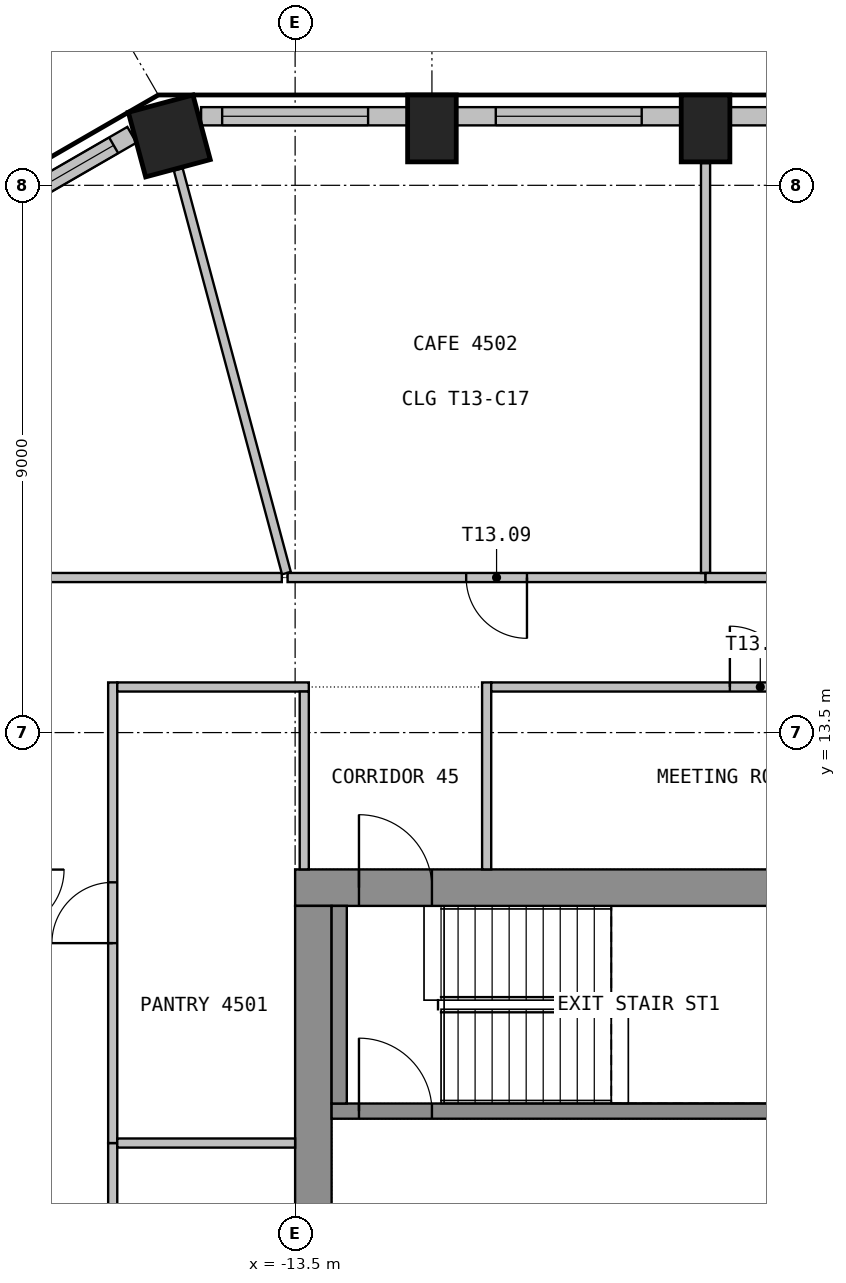
"""IFC4 building model, lengths in metres.
Left out: names, types, materials, properties, quantities, classifications, styles, units other than length and angle.
Written with IfcOpenShell. Run it as: python <this file> out.ifc"""

import sys

from ifc_helpers import new_model, si_unit, direction, frame, frame_2d, origin, origin_2d, place, context, subcontext, project, spatial, rectangle, extrude, element, fill, save


model = new_model("IFC4")
c1 = context("Model", 3, precision=1e-05, world=origin(), true_north=direction((0.0, 1.0)))
c2 = subcontext(c1, "Body", "Model", "MODEL_VIEW")
j1 = project(units=[si_unit("LENGTHUNIT", "METRE"), si_unit("PLANEANGLEUNIT", "RADIAN")], contexts=[c1])
p1 = place(None, origin())
s1 = spatial("IfcSite", under=j1, at=p1, CompositionType="ELEMENT")
p2 = place(p1, origin())
s2 = spatial("IfcBuilding", under=s1, at=p2, CompositionType="ELEMENT")
p3 = place(p2, frame((0.0, 0.0, 183.9)))
s3 = spatial("IfcBuildingStorey", under=s2, at=p3, CompositionType="ELEMENT", Elevation=183.9)
for number, where, z_axis, x_axis in (
    (1, (-6.75, 23.436, 0.0), (0.0, 0.0, 1.0), (-1.0, 0.0, 0.0)),
    (2, (-11.25, 23.436, 0.0), (0.0, 0.0, 1.0), (-1.0, 0.0, 0.0)),
):
    element("IfcColumn", number, at=place(p3, frame(where, z_axis=z_axis, x_axis=x_axis)), inside=s3, PredefinedType="COLUMN", context=c2, shape_type="SweptSolid", body=[
        extrude(rectangle(XDim=0.8, YDim=1.1, at=origin_2d()), origin(), (0.0, 0.0, 1.0), 3.55),
    ])
p4 = place(p3, frame((-15.57, 23.312, 0.0), z_axis=(0.0, 0.0, 1.0), x_axis=(-0.965925826289, -0.258819045103, 0.0)))
e3 = element("IfcColumn", 3, at=p4, inside=s3, PredefinedType="COLUMN", context=c2, shape_type="SweptSolid", body=[
    extrude(rectangle(XDim=1.1, YDim=1.1, at=origin_2d()), origin(), (0.0, 0.0, 1.0), 3.55),
])
p5 = place(p3, frame((-2.65, 23.635, 0.0), z_axis=(0.0, 0.0, 1.0), x_axis=(-1.0, 0.0, 0.0)))
e4 = element("IfcWall", 4, at=p5, inside=s3, PredefinedType="SOLIDWALL", context=c2, shape_type="SweptSolid", body=[
    extrude(rectangle(XDim=3.699, YDim=0.3, at=frame_2d((1.85, 0.0))), origin(), (0.0, 0.0, 1.0), 3.55),
])
p6 = place(p5, frame((0.649, 0.0, 0.9)))
e5 = element("IfcOpeningElement", 5, at=p6, cuts=e4, PredefinedType="OPENING", context=c2, shape_type="SweptSolid", body=[
    extrude(rectangle(XDim=2.4, YDim=2.1, at=frame_2d((1.2, 1.05))), frame((0.0, 0.16, 0.0), z_axis=(0.0, -1.0, 0.0), x_axis=(1.0, 0.0, 0.0)), (0.0, 0.0, 1.0), 0.32),
])
p7 = place(p3, frame((-7.15, 23.635, 0.0), z_axis=(0.0, 0.0, 1.0), x_axis=(-1.0, 0.0, 0.0)))
e6 = element("IfcWall", 6, at=p7, inside=s3, PredefinedType="SOLIDWALL", context=c2, shape_type="SweptSolid", body=[
    extrude(rectangle(XDim=3.699, YDim=0.3, at=frame_2d((1.85, 0.0))), origin(), (0.0, 0.0, 1.0), 3.55),
])
p8 = place(p7, frame((0.649, 0.0, 0.9)))
e7 = element("IfcOpeningElement", 7, at=p8, cuts=e6, PredefinedType="OPENING", context=c2, shape_type="SweptSolid", body=[
    extrude(rectangle(XDim=2.4, YDim=2.1, at=frame_2d((1.2, 1.05))), frame((0.0, 0.16, 0.0), z_axis=(0.0, -1.0, 0.0), x_axis=(1.0, 0.0, 0.0)), (0.0, 0.0, 1.0), 0.32),
])
p9 = place(p3, frame((-11.65, 23.635, 0.0), z_axis=(0.0, 0.0, 1.0), x_axis=(-1.0, 0.0, 0.0)))
e8 = element("IfcWall", 8, at=p9, inside=s3, PredefinedType="SOLIDWALL", context=c2, shape_type="SweptSolid", body=[
    extrude(rectangle(XDim=3.396, YDim=0.3, at=frame_2d((1.698, 0.0))), origin(), (0.0, 0.0, 1.0), 3.55),
])
p10 = place(p9, frame((0.649, 0.0, 0.9)))
e9 = element("IfcOpeningElement", 9, at=p10, cuts=e8, PredefinedType="OPENING", context=c2, shape_type="SweptSolid", body=[
    extrude(rectangle(XDim=2.4, YDim=2.1, at=frame_2d((1.2, 1.05))), frame((0.0, 0.16, 0.0), z_axis=(0.0, -1.0, 0.0), x_axis=(1.0, 0.0, 0.0)), (0.0, 0.0, 1.0), 0.32),
])
p11 = place(p3, frame((-16.184, 23.331, 0.0), z_axis=(0.0, 0.0, 1.0), x_axis=(-0.865994975416, -0.500052699777, 0.0)))
e10 = element("IfcWall", 10, at=p11, inside=s3, PredefinedType="SOLIDWALL", context=c2, shape_type="SweptSolid", body=[
    extrude(rectangle(XDim=3.093, YDim=0.3, at=frame_2d((1.546, 0.0))), origin(), (0.0, 0.0, 1.0), 3.55),
])
p12 = place(p11, frame((0.346, 0.0, 0.9)))
e11 = element("IfcOpeningElement", 11, at=p12, cuts=e10, PredefinedType="OPENING", context=c2, shape_type="SweptSolid", body=[
    extrude(rectangle(XDim=2.4, YDim=2.1, at=frame_2d((1.2, 1.05))), frame((0.0, 0.16, 0.0), z_axis=(0.0, -1.0, 0.0), x_axis=(1.0, 0.0, 0.0)), (0.0, 0.0, 1.0), 0.32),
])
p13 = place(p3, frame((-13.5, 10.95, 0.0), z_axis=(0.0, 0.0, 1.0), x_axis=(1.0, 0.0, 0.0)))
e12 = element("IfcWall", 12, at=p13, inside=s3, PredefinedType="SHEAR", context=c2, shape_type="SweptSolid", body=[
    extrude(rectangle(XDim=27.0, YDim=0.6, at=frame_2d((13.5, 0.0))), origin(), (0.0, 0.0, 1.0), 3.55),
])
p14 = place(p13, frame((12.3, 0.0, 0.0)))
e13 = element("IfcOpeningElement", 13, at=p14, cuts=e12, PredefinedType="OPENING", context=c2, shape_type="SweptSolid", body=[
    extrude(rectangle(XDim=2.4, YDim=2.1, at=frame_2d((1.2, 1.05))), frame((0.0, 0.31, 0.0), z_axis=(0.0, -1.0, 0.0), x_axis=(1.0, 0.0, 0.0)), (0.0, 0.0, 1.0), 0.62),
])
p15 = place(p13, frame((1.05, 0.0, 0.0)))
e14 = element("IfcOpeningElement", 14, at=p15, cuts=e12, PredefinedType="OPENING", context=c2, shape_type="SweptSolid", body=[
    extrude(rectangle(XDim=1.2, YDim=2.1, at=frame_2d((0.6, 1.05))), frame((0.0, 0.31, 0.0), z_axis=(0.0, -1.0, 0.0), x_axis=(1.0, 0.0, 0.0)), (0.0, 0.0, 1.0), 0.62),
])
p16 = place(p13, frame((24.75, 0.0, 0.0)))
e15 = element("IfcOpeningElement", 15, at=p16, cuts=e12, PredefinedType="OPENING", context=c2, shape_type="SweptSolid", body=[
    extrude(rectangle(XDim=1.2, YDim=2.1, at=frame_2d((0.6, 1.05))), frame((0.0, 0.31, 0.0), z_axis=(0.0, -1.0, 0.0), x_axis=(1.0, 0.0, 0.0)), (0.0, 0.0, 1.0), 0.62),
])
p17 = place(p3, frame((-13.2, -10.65, 0.0), z_axis=(0.0, 0.0, 1.0), x_axis=(0.0, 1.0, 0.0)))
e16 = element("IfcWall", 16, at=p17, inside=s3, PredefinedType="SHEAR", context=c2, shape_type="SweptSolid", body=[
    extrude(rectangle(XDim=21.3, YDim=0.6, at=frame_2d((10.65, 0.0))), origin(), (0.0, 0.0, 1.0), 3.55),
])
p18 = place(p17, frame((9.45, 0.0, 0.0)))
e17 = element("IfcOpeningElement", 17, at=p18, cuts=e16, PredefinedType="OPENING", context=c2, shape_type="SweptSolid", body=[
    extrude(rectangle(XDim=2.4, YDim=2.1, at=frame_2d((1.2, 1.05))), frame((0.0, 0.31, 0.0), z_axis=(0.0, -1.0, 0.0), x_axis=(1.0, 0.0, 0.0)), (0.0, 0.0, 1.0), 0.62),
])
p19 = place(p3, frame((-12.9, 7.275, 0.0), z_axis=(0.0, 0.0, 1.0), x_axis=(1.0, 0.0, 0.0)))
e18 = element("IfcWall", 18, at=p19, inside=s3, PredefinedType="SHEAR", context=c2, shape_type="SweptSolid", body=[
    extrude(rectangle(XDim=10.1, YDim=0.25, at=frame_2d((5.05, 0.0))), origin(), (0.0, 0.0, 1.0), 3.55),
])
p20 = place(p19, frame((0.45, 0.0, 0.0)))
e19 = element("IfcOpeningElement", 19, at=p20, cuts=e18, PredefinedType="OPENING", context=c2, shape_type="SweptSolid", body=[
    extrude(rectangle(XDim=1.2, YDim=2.1, at=frame_2d((0.6, 1.05))), frame((0.0, 0.135, 0.0), z_axis=(0.0, -1.0, 0.0), x_axis=(1.0, 0.0, 0.0)), (0.0, 0.0, 1.0), 0.27),
])
p21 = place(p3, frame((-12.775, 7.4, 0.0), z_axis=(0.0, 0.0, 1.0), x_axis=(0.0, 1.0, 0.0)))
e20 = element("IfcWall", 20, at=p21, inside=s3, PredefinedType="SHEAR", context=c2, shape_type="SweptSolid", body=[
    extrude(rectangle(XDim=3.25, YDim=0.25, at=frame_2d((1.625, 0.0))), origin(), (0.0, 0.0, 1.0), 3.55),
])
p22 = place(p3, frame((-13.719, 16.05, 0.0), z_axis=(0.0, 0.0, 1.0), x_axis=(-1.0, 0.0, 0.0)))
e21 = element("IfcWall", 21, at=p22, inside=s3, PredefinedType="PARTITIONING", context=c2, shape_type="SweptSolid", body=[
    extrude(rectangle(XDim=4.506, YDim=0.15, at=frame_2d((2.253, 0.0))), origin(), (0.0, 0.0, 1.0), 3.55),
])
p23 = place(p3, frame((-16.5, 1.425, 0.0), z_axis=(0.0, 0.0, 1.0), x_axis=(0.0, 1.0, 0.0)))
e22 = element("IfcWall", 22, at=p23, inside=s3, PredefinedType="PARTITIONING", context=c2, shape_type="SweptSolid", body=[
    extrude(rectangle(XDim=5.325, YDim=0.15, at=frame_2d((2.663, 0.0))), origin(), (0.0, 0.0, 1.0), 3.55),
])
p24 = place(p23, frame((2.163, 0.0, 0.0)))
e23 = element("IfcOpeningElement", 23, at=p24, cuts=e22, PredefinedType="OPENING", context=c2, shape_type="SweptSolid", body=[
    extrude(rectangle(XDim=1.0, YDim=2.1, at=frame_2d((0.5, 1.05))), frame((0.0, 0.085, 0.0), z_axis=(0.0, -1.0, 0.0), x_axis=(1.0, 0.0, 0.0)), (0.0, 0.0, 1.0), 0.17),
])
p25 = place(p3, frame((-16.5, 6.75, 0.0), z_axis=(0.0, 0.0, 1.0), x_axis=(0.0, 1.0, 0.0)))
e24 = element("IfcWall", 24, at=p25, inside=s3, PredefinedType="PARTITIONING", context=c2, shape_type="SweptSolid", body=[
    extrude(rectangle(XDim=7.575, YDim=0.15, at=frame_2d((3.788, 0.0))), origin(), (0.0, 0.0, 1.0), 3.55),
])
p26 = place(p25, frame((3.288, 0.0, 0.0)))
e25 = element("IfcOpeningElement", 25, at=p26, cuts=e24, PredefinedType="OPENING", context=c2, shape_type="SweptSolid", body=[
    extrude(rectangle(XDim=1.0, YDim=2.1, at=frame_2d((0.5, 1.05))), frame((0.0, 0.085, 0.0), z_axis=(0.0, -1.0, 0.0), x_axis=(1.0, 0.0, 0.0)), (0.0, 0.0, 1.0), 0.17),
])
p27 = place(p3, frame((-16.425, 6.75, 0.0), z_axis=(0.0, 0.0, 1.0), x_axis=(1.0, 0.0, 0.0)))
e26 = element("IfcWall", 26, at=p27, inside=s3, PredefinedType="PARTITIONING", context=c2, shape_type="SweptSolid", body=[
    extrude(rectangle(XDim=2.925, YDim=0.15, at=frame_2d((1.462, 0.0))), origin(), (0.0, 0.0, 1.0), 3.55),
])
p28 = place(p3, frame((-16.425, 14.25, 0.0), z_axis=(0.0, 0.0, 1.0), x_axis=(1.0, 0.0, 0.0)))
e27 = element("IfcWall", 27, at=p28, inside=s3, PredefinedType="PARTITIONING", context=c2, shape_type="SweptSolid", body=[
    extrude(rectangle(XDim=3.15, YDim=0.15, at=frame_2d((1.575, 0.0))), origin(), (0.0, 0.0, 1.0), 3.55),
])
p29 = place(p3, frame((-15.422, 22.761, 0.0), z_axis=(0.0, 0.0, 1.0), x_axis=(0.258807697684, -0.965928866749, 0.0)))
e28 = element("IfcWall", 28, at=p29, inside=s3, PredefinedType="PARTITIONING", context=c2, shape_type="SweptSolid", body=[
    extrude(rectangle(XDim=6.873, YDim=0.15, at=frame_2d((3.437, 0.0))), origin(), (0.0, 0.0, 1.0), 3.55),
])
p30 = place(p3, frame((-6.75, 16.05, 0.0), z_axis=(0.0, 0.0, 1.0), x_axis=(-1.0, 0.0, 0.0)))
e29 = element("IfcWall", 29, at=p30, inside=s3, PredefinedType="PARTITIONING", context=c2, shape_type="SweptSolid", body=[
    extrude(rectangle(XDim=6.874, YDim=0.15, at=frame_2d((3.437, 0.0))), origin(), (0.0, 0.0, 1.0), 3.55),
])
p31 = place(p30, frame((2.937, 0.0, 0.0)))
e30 = element("IfcOpeningElement", 30, at=p31, cuts=e29, PredefinedType="OPENING", context=c2, shape_type="SweptSolid", body=[
    extrude(rectangle(XDim=1.0, YDim=2.1, at=frame_2d((0.5, 1.05))), frame((0.0, 0.085, 0.0), z_axis=(0.0, -1.0, 0.0), x_axis=(1.0, 0.0, 0.0)), (0.0, 0.0, 1.0), 0.17),
])
p32 = place(p3, frame((-13.35, 14.175, 0.0), z_axis=(0.0, 0.0, 1.0), x_axis=(0.0, -1.0, 0.0)))
e31 = element("IfcWall", 31, at=p32, inside=s3, PredefinedType="PARTITIONING", context=c2, shape_type="SweptSolid", body=[
    extrude(rectangle(XDim=2.925, YDim=0.15, at=frame_2d((1.462, 0.0))), origin(), (0.0, 0.0, 1.0), 3.55),
])
p33 = place(p3, frame((-10.35, 11.25, 0.0), z_axis=(0.0, 0.0, 1.0), x_axis=(0.0, 1.0, 0.0)))
e32 = element("IfcWall", 32, at=p33, inside=s3, PredefinedType="PARTITIONING", context=c2, shape_type="SweptSolid", body=[
    extrude(rectangle(XDim=3.075, YDim=0.15, at=frame_2d((1.538, 0.0))), origin(), (0.0, 0.0, 1.0), 3.55),
])
p34 = place(p3, frame((-10.275, 14.25, 0.0), z_axis=(0.0, 0.0, 1.0), x_axis=(1.0, 0.0, 0.0)))
e33 = element("IfcWall", 33, at=p34, inside=s3, PredefinedType="PARTITIONING", context=c2, shape_type="SweptSolid", body=[
    extrude(rectangle(XDim=8.85, YDim=0.15, at=frame_2d((4.425, 0.0))), origin(), (0.0, 0.0, 1.0), 3.55),
])
p35 = place(p34, frame((3.925, 0.0, 0.0)))
e34 = element("IfcOpeningElement", 34, at=p35, cuts=e33, PredefinedType="OPENING", context=c2, shape_type="SweptSolid", body=[
    extrude(rectangle(XDim=1.0, YDim=2.1, at=frame_2d((0.5, 1.05))), frame((0.0, 0.085, 0.0), z_axis=(0.0, -1.0, 0.0), x_axis=(1.0, 0.0, 0.0)), (0.0, 0.0, 1.0), 0.17),
])
p36 = place(p3, frame((-6.75, 22.865, 0.0), z_axis=(0.0, 0.0, 1.0), x_axis=(0.0, -1.0, 0.0)))
e35 = element("IfcWall", 35, at=p36, inside=s3, PredefinedType="PARTITIONING", context=c2, shape_type="SweptSolid", body=[
    extrude(rectangle(XDim=6.74, YDim=0.15, at=frame_2d((3.37, 0.0))), origin(), (0.0, 0.0, 1.0), 3.55),
])
p37 = place(p3, frame((6.75, 16.05, 0.0), z_axis=(0.0, 0.0, 1.0), x_axis=(-1.0, 0.0, 0.0)))
e36 = element("IfcWall", 36, at=p37, inside=s3, PredefinedType="PARTITIONING", context=c2, shape_type="SweptSolid", body=[
    extrude(rectangle(XDim=13.5, YDim=0.15, at=frame_2d((6.75, 0.0))), origin(), (0.0, 0.0, 1.0), 3.55),
])
p38 = place(p37, frame((6.25, 0.0, 0.0)))
e37 = element("IfcOpeningElement", 37, at=p38, cuts=e36, PredefinedType="OPENING", context=c2, shape_type="SweptSolid", body=[
    extrude(rectangle(XDim=1.0, YDim=2.1, at=frame_2d((0.5, 1.05))), frame((0.0, 0.085, 0.0), z_axis=(0.0, -1.0, 0.0), x_axis=(1.0, 0.0, 0.0)), (0.0, 0.0, 1.0), 0.17),
])
p39 = place(p8, origin())
e38 = element("IfcWindow", 38, at=p39, inside=s3, PartitioningType="SINGLE_PANEL", PredefinedType="WINDOW", context=c2, shape_type="SweptSolid", body=[
    extrude(rectangle(XDim=2.4, YDim=2.1, at=frame_2d((1.2, 1.05))), frame((0.0, 0.03, 0.0), z_axis=(0.0, -1.0, 0.0), x_axis=(1.0, 0.0, 0.0)), (0.0, 0.0, 1.0), 0.06),
])
fill(e7, e38)
p40 = place(p10, origin())
e39 = element("IfcWindow", 39, at=p40, inside=s3, PartitioningType="SINGLE_PANEL", PredefinedType="WINDOW", context=c2, shape_type="SweptSolid", body=[
    extrude(rectangle(XDim=2.4, YDim=2.1, at=frame_2d((1.2, 1.05))), frame((0.0, 0.03, 0.0), z_axis=(0.0, -1.0, 0.0), x_axis=(1.0, 0.0, 0.0)), (0.0, 0.0, 1.0), 0.06),
])
fill(e9, e39)
p41 = place(p12, origin())
e40 = element("IfcWindow", 40, at=p41, inside=s3, PartitioningType="SINGLE_PANEL", PredefinedType="WINDOW", context=c2, shape_type="SweptSolid", body=[
    extrude(rectangle(XDim=2.4, YDim=2.1, at=frame_2d((1.2, 1.05))), frame((0.0, 0.03, 0.0), z_axis=(0.0, -1.0, 0.0), x_axis=(1.0, 0.0, 0.0)), (0.0, 0.0, 1.0), 0.06),
])
fill(e11, e40)
p42 = place(p15, origin())
e41 = element("IfcDoor", 41, at=p42, inside=s3, OperationType="SINGLE_SWING_RIGHT", PredefinedType="DOOR", context=c2, shape_type="SweptSolid", body=[
    extrude(rectangle(XDim=1.2, YDim=2.1, at=frame_2d((0.6, 1.05))), frame((0.0, 0.025, 0.0), z_axis=(0.0, -1.0, 0.0), x_axis=(1.0, 0.0, 0.0)), (0.0, 0.0, 1.0), 0.05),
])
fill(e14, e41)
p43 = place(p20, origin())
e42 = element("IfcDoor", 42, at=p43, inside=s3, OperationType="SINGLE_SWING_LEFT", PredefinedType="DOOR", context=c2, shape_type="SweptSolid", body=[
    extrude(rectangle(XDim=1.2, YDim=2.1, at=frame_2d((0.6, 1.05))), frame((0.0, 0.025, 0.0), z_axis=(0.0, -1.0, 0.0), x_axis=(1.0, 0.0, 0.0)), (0.0, 0.0, 1.0), 0.05),
])
fill(e19, e42)
p44 = place(p26, origin())
e43 = element("IfcDoor", 43, at=p44, inside=s3, OperationType="SINGLE_SWING_RIGHT", PredefinedType="DOOR", context=c2, shape_type="SweptSolid", body=[
    extrude(rectangle(XDim=1.0, YDim=2.1, at=frame_2d((0.5, 1.05))), frame((0.0, 0.025, 0.0), z_axis=(0.0, -1.0, 0.0), x_axis=(1.0, 0.0, 0.0)), (0.0, 0.0, 1.0), 0.05),
])
fill(e25, e43)
p45 = place(p31, origin())
e44 = element("IfcDoor", 44, at=p45, inside=s3, OperationType="SINGLE_SWING_RIGHT", PredefinedType="DOOR", context=c2, shape_type="SweptSolid", body=[
    extrude(rectangle(XDim=1.0, YDim=2.1, at=frame_2d((0.5, 1.05))), frame((0.0, 0.025, 0.0), z_axis=(0.0, -1.0, 0.0), x_axis=(1.0, 0.0, 0.0)), (0.0, 0.0, 1.0), 0.05),
])
fill(e30, e44)
p46 = place(p35, origin())
e45 = element("IfcDoor", 45, at=p46, inside=s3, OperationType="SINGLE_SWING_LEFT", PredefinedType="DOOR", context=c2, shape_type="SweptSolid", body=[
    extrude(rectangle(XDim=1.0, YDim=2.1, at=frame_2d((0.5, 1.05))), frame((0.0, 0.025, 0.0), z_axis=(0.0, -1.0, 0.0), x_axis=(1.0, 0.0, 0.0)), (0.0, 0.0, 1.0), 0.05),
])
fill(e34, e45)
save(model, sys.argv[1])
